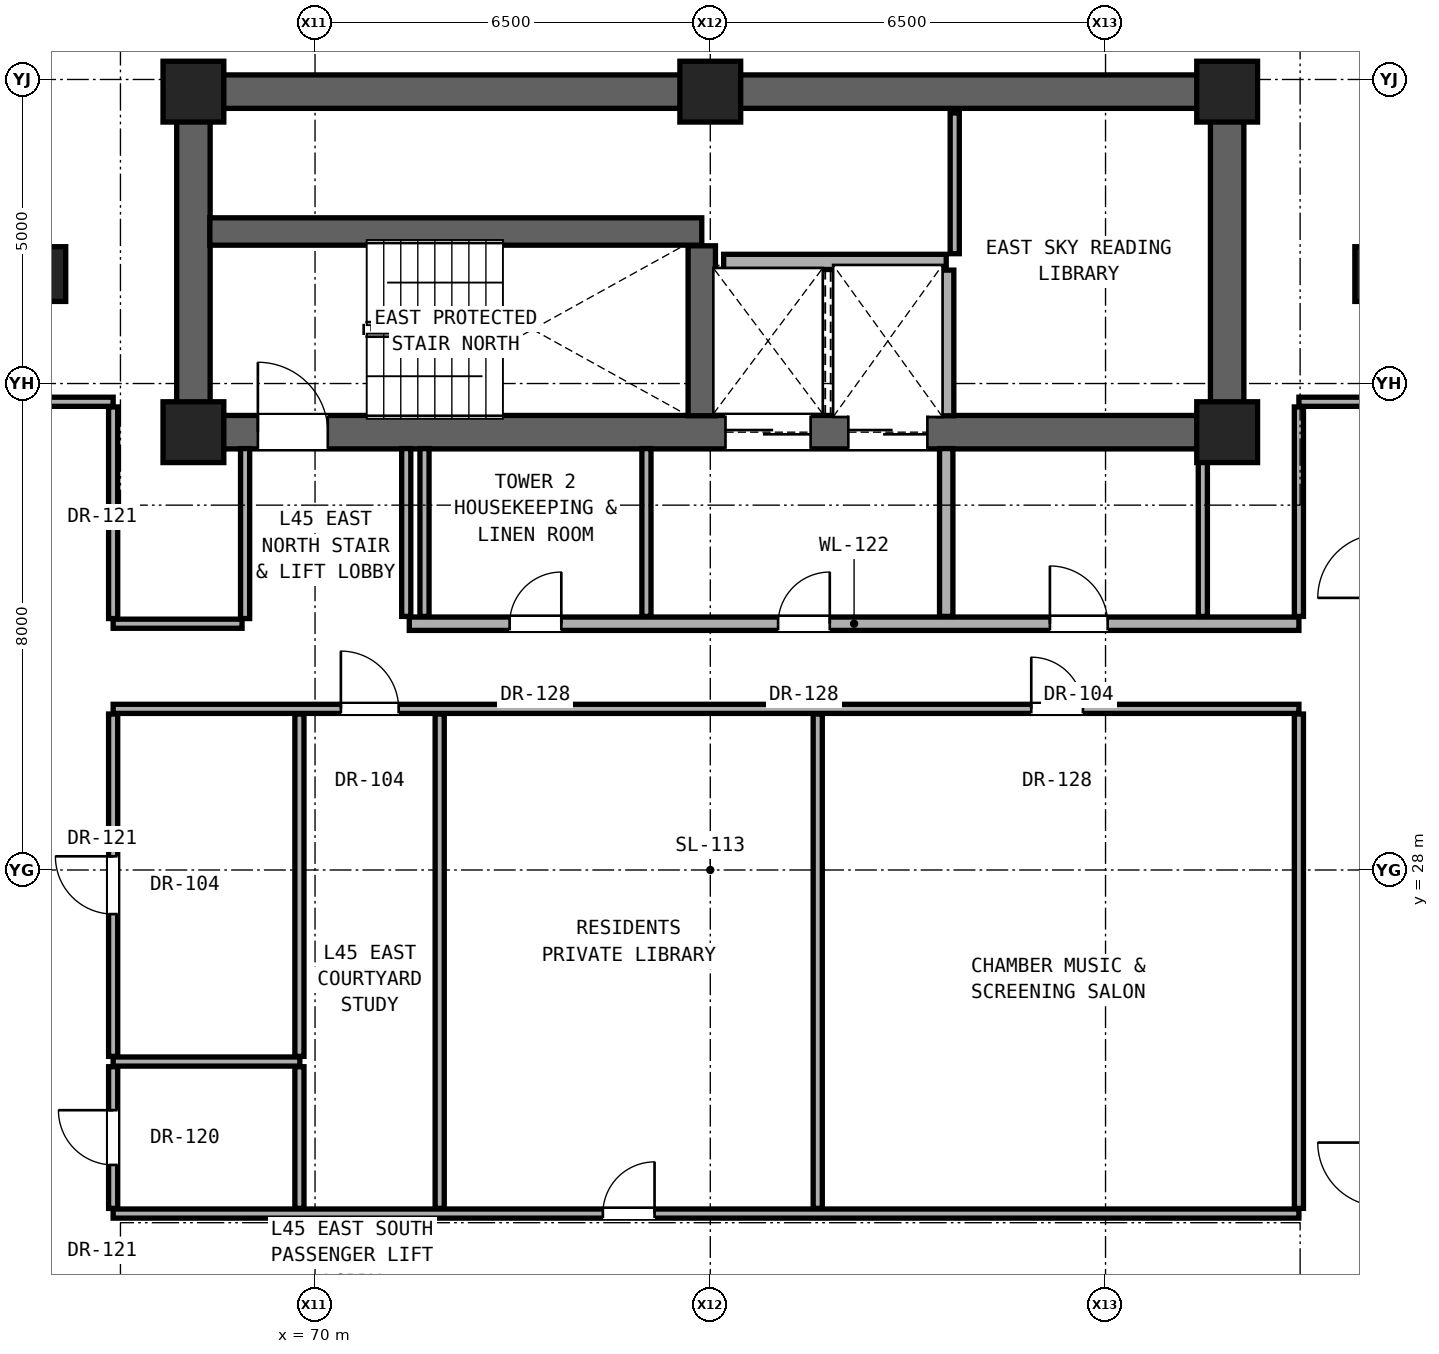
"""IFC4 building model, lengths in metres.
Left out: names, types, materials, properties, quantities, classifications, styles, units other than length and angle.
Written with IfcOpenShell. Run it as: python <this file> out.ifc"""

import sys

from ifc_helpers import new_model, si_unit, direction, frame, frame_2d, origin, origin_2d, place, context, subcontext, project, spatial, rectangle, extrude, element, fill, save


model = new_model("IFC4")
c1 = context("Model", 3, precision=1e-05, world=origin(), true_north=direction((0.0, 1.0)))
c2 = subcontext(c1, "Body", "Model", "MODEL_VIEW")
j1 = project(units=[si_unit("LENGTHUNIT", "METRE"), si_unit("PLANEANGLEUNIT", "RADIAN")], contexts=[c1])
p1 = place(None, origin())
s1 = spatial("IfcSite", under=j1, at=p1, CompositionType="ELEMENT")
p2 = place(p1, origin())
s2 = spatial("IfcBuilding", under=s1, at=p2, CompositionType="ELEMENT")
p3 = place(p2, frame((0.0, 0.0, 160.9)))
s3 = spatial("IfcBuildingStorey", under=s2, at=p3, CompositionType="ELEMENT", Elevation=160.9)
for number, where, z_axis, x_axis in (
    (1, (68.0, 35.2, 0.0), (0.0, 0.0, 1.0), (1.0, 0.0, 0.0)),
    (2, (85.0, 35.2, 0.0), (0.0, 0.0, 1.0), (1.0, 0.0, 0.0)),
    (3, (68.0, 40.8, 0.0), (0.0, 0.0, 1.0), (1.0, 0.0, 0.0)),
    (4, (76.5, 40.8, 0.0), (0.0, 0.0, 1.0), (1.0, 0.0, 0.0)),
    (5, (85.0, 40.8, 0.0), (0.0, 0.0, 1.0), (1.0, 0.0, 0.0)),
):
    element("IfcColumn", number, at=place(p3, frame(where, z_axis=z_axis, x_axis=x_axis)), inside=s3, PredefinedType="COLUMN", context=c2, shape_type="SweptSolid", body=[
        extrude(rectangle(XDim=1.0, YDim=1.0, at=origin_2d()), origin(), (0.0, 0.0, 1.0), 3.25),
    ])
for number, where, z_axis, x_axis in (
    (6, (65.6, 37.8, 0.0), (0.0, 0.0, 1.0), (1.0, 0.0, 0.0)),
    (7, (87.4, 37.8, 0.0), (0.0, 0.0, 1.0), (1.0, 0.0, 0.0)),
):
    element("IfcColumn", number, at=place(p3, frame(where, z_axis=z_axis, x_axis=x_axis)), inside=s3, PredefinedType="PILASTER", context=c2, shape_type="SweptSolid", body=[
        extrude(rectangle(XDim=0.6, YDim=0.9, at=origin_2d()), origin(), (0.0, 0.0, 1.0), 3.25),
    ])
p4 = place(p3, frame((68.0, 40.8, 0.0), z_axis=(0.0, 0.0, 1.0), x_axis=(1.0, 0.0, 0.0)))
e8 = element("IfcWall", 8, at=p4, inside=s3, PredefinedType="SHEAR", context=c2, shape_type="SweptSolid", body=[
    extrude(rectangle(XDim=17.0, YDim=0.55, at=frame_2d((8.5, 0.0))), origin(), (0.0, 0.0, 1.0), 3.05),
])
for number, where, z_axis, x_axis in (
    (9, (68.0, 35.2, 0.0), (0.0, 0.0, 1.0), (0.0, 1.0, 0.0)),
    (10, (85.0, 35.2, 0.0), (0.0, 0.0, 1.0), (0.0, 1.0, 0.0)),
):
    element("IfcWall", number, at=place(p3, frame(where, z_axis=z_axis, x_axis=x_axis)), inside=s3, PredefinedType="SHEAR", context=c2, shape_type="SweptSolid", body=[
        extrude(rectangle(XDim=5.6, YDim=0.55, at=frame_2d((2.8, 0.0))), origin(), (0.0, 0.0, 1.0), 3.05),
    ])
p5 = place(p3, frame((68.0, 35.2, 0.0), z_axis=(0.0, 0.0, 1.0), x_axis=(1.0, 0.0, 0.0)))
e11 = element("IfcWall", 11, at=p5, inside=s3, PredefinedType="SHEAR", context=c2, shape_type="SweptSolid", body=[
    extrude(rectangle(XDim=17.0, YDim=0.55, at=frame_2d((8.5, 0.0))), origin(), (0.0, 0.0, 1.0), 3.05),
])
p6 = place(p5, frame((1.06, 0.0, 0.0)))
e12 = element("IfcOpeningElement", 12, at=p6, cuts=e11, PredefinedType="OPENING", context=c2, shape_type="SweptSolid", body=[
    extrude(rectangle(XDim=1.15, YDim=2.2, at=frame_2d((0.575, 1.1))), frame((0.0, 0.285, 0.0), z_axis=(0.0, -1.0, 0.0), x_axis=(1.0, 0.0, 0.0)), (0.0, 0.0, 1.0), 0.57),
])
p7 = place(p5, frame((8.75, 0.0, 0.0)))
e13 = element("IfcOpeningElement", 13, at=p7, cuts=e11, PredefinedType="OPENING", context=c2, shape_type="SweptSolid", body=[
    extrude(rectangle(XDim=1.4, YDim=2.35, at=frame_2d((0.7, 1.175))), frame((0.0, 0.285, 0.0), z_axis=(0.0, -1.0, 0.0), x_axis=(1.0, 0.0, 0.0)), (0.0, 0.0, 1.0), 0.57),
])
p8 = place(p5, frame((10.77, 0.0, 0.0)))
e14 = element("IfcOpeningElement", 14, at=p8, cuts=e11, PredefinedType="OPENING", context=c2, shape_type="SweptSolid", body=[
    extrude(rectangle(XDim=1.3, YDim=2.3, at=frame_2d((0.65, 1.15))), frame((0.0, 0.285, 0.0), z_axis=(0.0, -1.0, 0.0), x_axis=(1.0, 0.0, 0.0)), (0.0, 0.0, 1.0), 0.57),
])
p9 = place(p3, frame((66.68, 22.35, 0.0), z_axis=(0.0, 0.0, 1.0), x_axis=(1.0, 0.0, 0.0)))
e15 = element("IfcWall", 15, at=p9, inside=s3, PredefinedType="PARTITIONING", context=c2, shape_type="SweptSolid", body=[
    extrude(rectangle(XDim=19.5, YDim=0.15, at=frame_2d((9.75, 0.0))), origin(), (0.0, 0.0, 1.0), 2.186),
])
p10 = place(p9, frame((8.053, 0.0, 0.0)))
e16 = element("IfcOpeningElement", 16, at=p10, cuts=e15, PredefinedType="OPENING", context=c2, shape_type="SweptSolid", body=[
    extrude(rectangle(XDim=0.85, YDim=2.01, at=frame_2d((0.425, 1.005))), frame((0.0, 0.085, 0.0), z_axis=(0.0, -1.0, 0.0), x_axis=(1.0, 0.0, 0.0)), (0.0, 0.0, 1.0), 0.17),
])
p11 = place(p3, frame((66.68, 24.85, 0.0), z_axis=(0.0, 0.0, 1.0), x_axis=(1.0, 0.0, 0.0)))
e17 = element("IfcWall", 17, at=p11, inside=s3, PredefinedType="PARTITIONING", context=c2, shape_type="SweptSolid", body=[
    extrude(rectangle(XDim=3.07, YDim=0.15, at=frame_2d((1.535, 0.0))), origin(), (0.0, 0.0, 1.0), 2.186),
])
p12 = place(p3, frame((66.68, 30.65, 0.0), z_axis=(0.0, 0.0, 1.0), x_axis=(1.0, 0.0, 0.0)))
e18 = element("IfcWall", 18, at=p12, inside=s3, PredefinedType="PARTITIONING", context=c2, shape_type="SweptSolid", body=[
    extrude(rectangle(XDim=19.5, YDim=0.15, at=frame_2d((9.75, 0.0))), origin(), (0.0, 0.0, 1.0), 2.186),
])
p13 = place(p12, frame((3.745, 0.0, 0.0)))
e19 = element("IfcOpeningElement", 19, at=p13, cuts=e18, PredefinedType="OPENING", context=c2, shape_type="SweptSolid", body=[
    extrude(rectangle(XDim=0.95, YDim=2.15, at=frame_2d((0.475, 1.075))), frame((0.0, 0.085, 0.0), z_axis=(0.0, -1.0, 0.0), x_axis=(1.0, 0.0, 0.0)), (0.0, 0.0, 1.0), 0.17),
])
p14 = place(p12, frame((15.098, 0.0, 0.0)))
e20 = element("IfcOpeningElement", 20, at=p14, cuts=e18, PredefinedType="OPENING", context=c2, shape_type="SweptSolid", body=[
    extrude(rectangle(XDim=0.85, YDim=2.01, at=frame_2d((0.425, 1.005))), frame((0.0, 0.085, 0.0), z_axis=(0.0, -1.0, 0.0), x_axis=(1.0, 0.0, 0.0)), (0.0, 0.0, 1.0), 0.17),
])
p15 = place(p3, frame((66.68, 32.05, 0.0), z_axis=(0.0, 0.0, 1.0), x_axis=(1.0, 0.0, 0.0)))
e21 = element("IfcWall", 21, at=p15, inside=s3, PredefinedType="PARTITIONING", context=c2, shape_type="SweptSolid", body=[
    extrude(rectangle(XDim=2.12, YDim=0.15, at=frame_2d((1.06, 0.0))), origin(), (0.0, 0.0, 1.0), 2.186),
])
p16 = place(p3, frame((71.55, 32.05, 0.0), z_axis=(0.0, 0.0, 1.0), x_axis=(1.0, 0.0, 0.0)))
e22 = element("IfcWall", 22, at=p16, inside=s3, PredefinedType="SOLIDWALL", context=c2, shape_type="SweptSolid", body=[
    extrude(rectangle(XDim=14.63, YDim=0.22, at=frame_2d((7.315, 0.0))), origin(), (0.0, 0.0, 1.0), 2.186),
])
p17 = place(p16, frame((6.065, 0.0, 0.0)))
e23 = element("IfcOpeningElement", 23, at=p17, cuts=e22, PredefinedType="OPENING", context=c2, shape_type="SweptSolid", body=[
    extrude(rectangle(XDim=0.85, YDim=2.01, at=frame_2d((0.425, 1.005))), frame((0.0, 0.12, 0.0), z_axis=(0.0, -1.0, 0.0), x_axis=(1.0, 0.0, 0.0)), (0.0, 0.0, 1.0), 0.24),
])
p18 = place(p16, frame((10.535, 0.0, 0.0)))
e24 = element("IfcOpeningElement", 24, at=p18, cuts=e22, PredefinedType="OPENING", context=c2, shape_type="SweptSolid", body=[
    extrude(rectangle(XDim=0.95, YDim=2.15, at=frame_2d((0.475, 1.075))), frame((0.0, 0.12, 0.0), z_axis=(0.0, -1.0, 0.0), x_axis=(1.0, 0.0, 0.0)), (0.0, 0.0, 1.0), 0.24),
])
p19 = place(p16, frame((1.65, 0.0, 0.0)))
e25 = element("IfcOpeningElement", 25, at=p19, cuts=e22, PredefinedType="OPENING", context=c2, shape_type="SweptSolid", body=[
    extrude(rectangle(XDim=0.85, YDim=2.01, at=frame_2d((0.425, 1.005))), frame((0.0, 0.12, 0.0), z_axis=(0.0, -1.0, 0.0), x_axis=(1.0, 0.0, 0.0)), (0.0, 0.0, 1.0), 0.24),
])
p20 = place(p3, frame((65.32, 35.7, 0.0), z_axis=(0.0, 0.0, 1.0), x_axis=(1.0, 0.0, 0.0)))
e26 = element("IfcWall", 26, at=p20, inside=s3, PredefinedType="PARTITIONING", context=c2, shape_type="SweptSolid", body=[
    extrude(rectangle(XDim=1.36, YDim=0.15, at=frame_2d((0.68, 0.0))), origin(), (0.0, 0.0, 1.0), 3.05),
])
p21 = place(p3, frame((86.18, 35.7, 0.0), z_axis=(0.0, 0.0, 1.0), x_axis=(1.0, 0.0, 0.0)))
e27 = element("IfcWall", 27, at=p21, inside=s3, PredefinedType="PARTITIONING", context=c2, shape_type="SweptSolid", body=[
    extrude(rectangle(XDim=1.36, YDim=0.15, at=frame_2d((0.68, 0.0))), origin(), (0.0, 0.0, 1.0), 3.05),
])
p22 = place(p3, frame((76.72, 38.0, 0.0), z_axis=(0.0, 0.0, 1.0), x_axis=(1.0, 0.0, 0.0)))
e28 = element("IfcWall", 28, at=p22, inside=s3, PredefinedType="SOLIDWALL", context=c2, shape_type="SweptSolid", body=[
    extrude(rectangle(XDim=3.66, YDim=0.25, at=frame_2d((1.83, 0.0))), origin(), (0.0, 0.0, 1.0), 3.05),
])
p23 = place(p3, frame((68.27, 38.5, 0.0), z_axis=(0.0, 0.0, 1.0), x_axis=(1.0, 0.0, 0.0)))
e29 = element("IfcWall", 29, at=p23, inside=s3, PredefinedType="SHEAR", context=c2, shape_type="SweptSolid", body=[
    extrude(rectangle(XDim=8.09, YDim=0.45, at=frame_2d((4.045, 0.0))), origin(), (0.0, 0.0, 1.0), 3.05),
])
p24 = place(p3, frame((66.68, 22.435, 0.0), z_axis=(0.0, 0.0, 1.0), x_axis=(0.0, 1.0, 0.0)))
e30 = element("IfcWall", 30, at=p24, inside=s3, PredefinedType="PARTITIONING", context=c2, shape_type="SweptSolid", body=[
    extrude(rectangle(XDim=2.33, YDim=0.15, at=frame_2d((1.165, 0.0))), origin(), (0.0, 0.0, 1.0), 3.05),
])
p25 = place(p24, frame((0.715, 0.0, 0.0)))
e31 = element("IfcOpeningElement", 31, at=p25, cuts=e30, PredefinedType="OPENING", context=c2, shape_type="SweptSolid", body=[
    extrude(rectangle(XDim=0.9, YDim=2.1, at=frame_2d((0.45, 1.05))), frame((0.0, 0.085, 0.0), z_axis=(0.0, -1.0, 0.0), x_axis=(1.0, 0.0, 0.0)), (0.0, 0.0, 1.0), 0.17),
])
p26 = place(p3, frame((66.68, 24.935, 0.0), z_axis=(0.0, 0.0, 1.0), x_axis=(0.0, 1.0, 0.0)))
e32 = element("IfcWall", 32, at=p26, inside=s3, PredefinedType="PARTITIONING", context=c2, shape_type="SweptSolid", body=[
    extrude(rectangle(XDim=5.63, YDim=0.15, at=frame_2d((2.815, 0.0))), origin(), (0.0, 0.0, 1.0), 2.346),
])
p27 = place(p26, frame((2.34, 0.0, 0.0)))
e33 = element("IfcOpeningElement", 33, at=p27, cuts=e32, PredefinedType="OPENING", context=c2, shape_type="SweptSolid", body=[
    extrude(rectangle(XDim=0.95, YDim=2.15, at=frame_2d((0.475, 1.075))), frame((0.0, 0.085, 0.0), z_axis=(0.0, -1.0, 0.0), x_axis=(1.0, 0.0, 0.0)), (0.0, 0.0, 1.0), 0.17),
])
p28 = place(p3, frame((66.68, 32.135, 0.0), z_axis=(0.0, 0.0, 1.0), x_axis=(0.0, 1.0, 0.0)))
e34 = element("IfcWall", 34, at=p28, inside=s3, PredefinedType="PARTITIONING", context=c2, shape_type="SweptSolid", body=[
    extrude(rectangle(XDim=3.48, YDim=0.15, at=frame_2d((1.74, 0.0))), origin(), (0.0, 0.0, 1.0), 2.442),
])
p29 = place(p3, frame((68.85, 32.135, 0.0), z_axis=(0.0, 0.0, 1.0), x_axis=(0.0, 1.0, 0.0)))
e35 = element("IfcWall", 35, at=p29, inside=s3, PredefinedType="PARTITIONING", context=c2, shape_type="SweptSolid", body=[
    extrude(rectangle(XDim=2.795, YDim=0.15, at=frame_2d((1.397, 0.0))), origin(), (0.0, 0.0, 1.0), 3.05),
])
p30 = place(p3, frame((69.743, 22.435, 0.0), z_axis=(0.0, 0.0, 1.0), x_axis=(0.0, 1.0, 0.0)))
e36 = element("IfcWall", 36, at=p30, inside=s3, PredefinedType="PARTITIONING", context=c2, shape_type="SweptSolid", body=[
    extrude(rectangle(XDim=2.33, YDim=0.15, at=frame_2d((1.165, 0.0))), origin(), (0.0, 0.0, 1.0), 3.05),
])
p31 = place(p3, frame((69.743, 24.935, 0.0), z_axis=(0.0, 0.0, 1.0), x_axis=(0.0, 1.0, 0.0)))
e37 = element("IfcWall", 37, at=p31, inside=s3, PredefinedType="PARTITIONING", context=c2, shape_type="SweptSolid", body=[
    extrude(rectangle(XDim=5.63, YDim=0.15, at=frame_2d((2.815, 0.0))), origin(), (0.0, 0.0, 1.0), 2.186),
])
for number, where, z_axis, x_axis in (
    (38, (71.5, 32.17, 0.0), (0.0, 0.0, 1.0), (0.0, 1.0, 0.0)),
    (39, (71.8, 32.17, 0.0), (0.0, 0.0, 1.0), (0.0, 1.0, 0.0)),
):
    element("IfcWall", number, at=place(p3, frame(where, z_axis=z_axis, x_axis=x_axis)), inside=s3, PredefinedType="PARTITIONING", context=c2, shape_type="SweptSolid", body=[
        extrude(rectangle(XDim=2.76, YDim=0.15, at=frame_2d((1.38, 0.0))), origin(), (0.0, 0.0, 1.0), 3.05),
    ])
p32 = place(p3, frame((72.05, 22.435, 0.0), z_axis=(0.0, 0.0, 1.0), x_axis=(0.0, 1.0, 0.0)))
e40 = element("IfcWall", 40, at=p32, inside=s3, PredefinedType="PARTITIONING", context=c2, shape_type="SweptSolid", body=[
    extrude(rectangle(XDim=8.13, YDim=0.15, at=frame_2d((4.065, 0.0))), origin(), (0.0, 0.0, 1.0), 2.186),
])
p33 = place(p3, frame((75.45, 32.17, 0.0), z_axis=(0.0, 0.0, 1.0), x_axis=(0.0, 1.0, 0.0)))
e41 = element("IfcWall", 41, at=p33, inside=s3, PredefinedType="PARTITIONING", context=c2, shape_type="SweptSolid", body=[
    extrude(rectangle(XDim=2.76, YDim=0.15, at=frame_2d((1.38, 0.0))), origin(), (0.0, 0.0, 1.0), 3.05),
])
p34 = place(p3, frame((76.36, 35.47, 0.0), z_axis=(0.0, 0.0, 1.0), x_axis=(0.0, 1.0, 0.0)))
e42 = element("IfcWall", 42, at=p34, inside=s3, PredefinedType="SHEAR", context=c2, shape_type="SweptSolid", body=[
    extrude(rectangle(XDim=2.795, YDim=0.45, at=frame_2d((1.397, 0.0))), origin(), (0.0, 0.0, 1.0), 3.05),
])
p35 = place(p3, frame((78.267, 22.435, 0.0), z_axis=(0.0, 0.0, 1.0), x_axis=(0.0, 1.0, 0.0)))
e43 = element("IfcWall", 43, at=p35, inside=s3, PredefinedType="PARTITIONING", context=c2, shape_type="SweptSolid", body=[
    extrude(rectangle(XDim=8.13, YDim=0.15, at=frame_2d((4.065, 0.0))), origin(), (0.0, 0.0, 1.0), 2.186),
])
p36 = place(p3, frame((80.38, 32.17, 0.0), z_axis=(0.0, 0.0, 1.0), x_axis=(0.0, 1.0, 0.0)))
e44 = element("IfcWall", 44, at=p36, inside=s3, PredefinedType="SOLIDWALL", context=c2, shape_type="SweptSolid", body=[
    extrude(rectangle(XDim=2.76, YDim=0.22, at=frame_2d((1.38, 0.0))), origin(), (0.0, 0.0, 1.0), 3.05),
])
p37 = place(p3, frame((80.38, 35.47, 0.0), z_axis=(0.0, 0.0, 1.0), x_axis=(0.0, 1.0, 0.0)))
e45 = element("IfcWall", 45, at=p37, inside=s3, PredefinedType="SOLIDWALL", context=c2, shape_type="SweptSolid", body=[
    extrude(rectangle(XDim=2.395, YDim=0.25, at=frame_2d((1.198, 0.0))), origin(), (0.0, 0.0, 1.0), 3.05),
])
p38 = place(p3, frame((80.52, 38.135, 0.0), z_axis=(0.0, 0.0, 1.0), x_axis=(0.0, 1.0, 0.0)))
e46 = element("IfcWall", 46, at=p38, inside=s3, PredefinedType="PARTITIONING", context=c2, shape_type="SweptSolid", body=[
    extrude(rectangle(XDim=2.315, YDim=0.15, at=frame_2d((1.157, 0.0))), origin(), (0.0, 0.0, 1.0), 3.05),
])
p39 = place(p3, frame((84.6, 32.17, 0.0), z_axis=(0.0, 0.0, 1.0), x_axis=(0.0, 1.0, 0.0)))
e47 = element("IfcWall", 47, at=p39, inside=s3, PredefinedType="PARTITIONING", context=c2, shape_type="SweptSolid", body=[
    extrude(rectangle(XDim=2.76, YDim=0.15, at=frame_2d((1.38, 0.0))), origin(), (0.0, 0.0, 1.0), 3.05),
])
p40 = place(p3, frame((86.18, 22.435, 0.0), z_axis=(0.0, 0.0, 1.0), x_axis=(0.0, 1.0, 0.0)))
e48 = element("IfcWall", 48, at=p40, inside=s3, PredefinedType="PARTITIONING", context=c2, shape_type="SweptSolid", body=[
    extrude(rectangle(XDim=8.13, YDim=0.15, at=frame_2d((4.065, 0.0))), origin(), (0.0, 0.0, 1.0), 2.346),
])
p41 = place(p3, frame((86.18, 32.17, 0.0), z_axis=(0.0, 0.0, 1.0), x_axis=(0.0, 1.0, 0.0)))
e49 = element("IfcWall", 49, at=p41, inside=s3, PredefinedType="PARTITIONING", context=c2, shape_type="SweptSolid", body=[
    extrude(rectangle(XDim=3.445, YDim=0.15, at=frame_2d((1.723, 0.0))), origin(), (0.0, 0.0, 1.0), 2.442),
])
p42 = place(p6, origin())
e50 = element("IfcDoor", 50, at=p42, inside=s3, OperationType="SINGLE_SWING_LEFT", PredefinedType="DOOR", context=c2, shape_type="SweptSolid", body=[
    extrude(rectangle(XDim=1.15, YDim=2.2, at=frame_2d((0.575, 1.1))), frame((0.0, 0.025, 0.0), z_axis=(0.0, -1.0, 0.0), x_axis=(1.0, 0.0, 0.0)), (0.0, 0.0, 1.0), 0.05),
])
fill(e12, e50)
p43 = place(p17, origin())
e51 = element("IfcDoor", 51, at=p43, inside=s3, OperationType="SINGLE_SWING_RIGHT", PredefinedType="DOOR", context=c2, shape_type="SweptSolid", body=[
    extrude(rectangle(XDim=0.85, YDim=2.01, at=frame_2d((0.425, 1.005))), frame((0.0, 0.025, 0.0), z_axis=(0.0, -1.0, 0.0), x_axis=(1.0, 0.0, 0.0)), (0.0, 0.0, 1.0), 0.05),
])
fill(e23, e51)
p44 = place(p18, origin())
e52 = element("IfcDoor", 52, at=p44, inside=s3, OperationType="SINGLE_SWING_LEFT", PredefinedType="DOOR", context=c2, shape_type="SweptSolid", body=[
    extrude(rectangle(XDim=0.95, YDim=2.15, at=frame_2d((0.475, 1.075))), frame((0.0, 0.025, 0.0), z_axis=(0.0, -1.0, 0.0), x_axis=(1.0, 0.0, 0.0)), (0.0, 0.0, 1.0), 0.05),
])
fill(e24, e52)
p45 = place(p19, origin())
e53 = element("IfcDoor", 53, at=p45, inside=s3, OperationType="SINGLE_SWING_RIGHT", PredefinedType="DOOR", context=c2, shape_type="SweptSolid", body=[
    extrude(rectangle(XDim=0.85, YDim=2.01, at=frame_2d((0.425, 1.005))), frame((0.0, 0.025, 0.0), z_axis=(0.0, -1.0, 0.0), x_axis=(1.0, 0.0, 0.0)), (0.0, 0.0, 1.0), 0.05),
])
fill(e25, e53)
p46 = place(p25, origin())
e54 = element("IfcDoor", 54, at=p46, inside=s3, OperationType="SINGLE_SWING_RIGHT", PredefinedType="DOOR", context=c2, shape_type="SweptSolid", body=[
    extrude(rectangle(XDim=0.9, YDim=2.1, at=frame_2d((0.45, 1.05))), frame((0.0, 0.025, 0.0), z_axis=(0.0, -1.0, 0.0), x_axis=(1.0, 0.0, 0.0)), (0.0, 0.0, 1.0), 0.05),
])
fill(e31, e54)
p47 = place(p27, origin())
e55 = element("IfcDoor", 55, at=p47, inside=s3, OperationType="SINGLE_SWING_RIGHT", PredefinedType="DOOR", context=c2, shape_type="SweptSolid", body=[
    extrude(rectangle(XDim=0.95, YDim=2.15, at=frame_2d((0.475, 1.075))), frame((0.0, 0.025, 0.0), z_axis=(0.0, -1.0, 0.0), x_axis=(1.0, 0.0, 0.0)), (0.0, 0.0, 1.0), 0.05),
])
fill(e33, e55)
p48 = place(p13, origin())
e56 = element("IfcDoor", 56, at=p48, inside=s3, OperationType="SINGLE_SWING_LEFT", PredefinedType="DOOR", context=c2, shape_type="SweptSolid", body=[
    extrude(rectangle(XDim=0.95, YDim=2.15, at=frame_2d((0.475, 1.075))), frame((0.0, 0.025, 0.0), z_axis=(0.0, -1.0, 0.0), x_axis=(1.0, 0.0, 0.0)), (0.0, 0.0, 1.0), 0.05),
])
fill(e19, e56)
p49 = place(p10, origin())
e57 = element("IfcDoor", 57, at=p49, inside=s3, OperationType="SINGLE_SWING_RIGHT", PredefinedType="DOOR", context=c2, shape_type="SweptSolid", body=[
    extrude(rectangle(XDim=0.85, YDim=2.01, at=frame_2d((0.425, 1.005))), frame((0.0, 0.025, 0.0), z_axis=(0.0, -1.0, 0.0), x_axis=(1.0, 0.0, 0.0)), (0.0, 0.0, 1.0), 0.05),
])
fill(e16, e57)
p50 = place(p14, origin())
e58 = element("IfcDoor", 58, at=p50, inside=s3, OperationType="SINGLE_SWING_LEFT", PredefinedType="DOOR", context=c2, shape_type="SweptSolid", body=[
    extrude(rectangle(XDim=0.85, YDim=2.01, at=frame_2d((0.425, 1.005))), frame((0.0, 0.025, 0.0), z_axis=(0.0, -1.0, 0.0), x_axis=(1.0, 0.0, 0.0)), (0.0, 0.0, 1.0), 0.05),
])
fill(e20, e58)
p51 = place(p7, origin())
e59 = element("IfcDoor", 59, at=p51, inside=s3, OperationType="DOUBLE_DOOR_SLIDING", PredefinedType="DOOR", context=c2, shape_type="SweptSolid", body=[
    extrude(rectangle(XDim=1.4, YDim=2.35, at=frame_2d((0.7, 1.175))), frame((0.0, 0.025, 0.0), z_axis=(0.0, -1.0, 0.0), x_axis=(1.0, 0.0, 0.0)), (0.0, 0.0, 1.0), 0.05),
])
fill(e13, e59)
p52 = place(p8, origin())
e60 = element("IfcDoor", 60, at=p52, inside=s3, OperationType="DOUBLE_DOOR_SLIDING", PredefinedType="DOOR", context=c2, shape_type="SweptSolid", body=[
    extrude(rectangle(XDim=1.3, YDim=2.3, at=frame_2d((0.65, 1.15))), frame((0.0, 0.025, 0.0), z_axis=(0.0, -1.0, 0.0), x_axis=(1.0, 0.0, 0.0)), (0.0, 0.0, 1.0), 0.05),
])
fill(e14, e60)
save(model, sys.argv[1])
